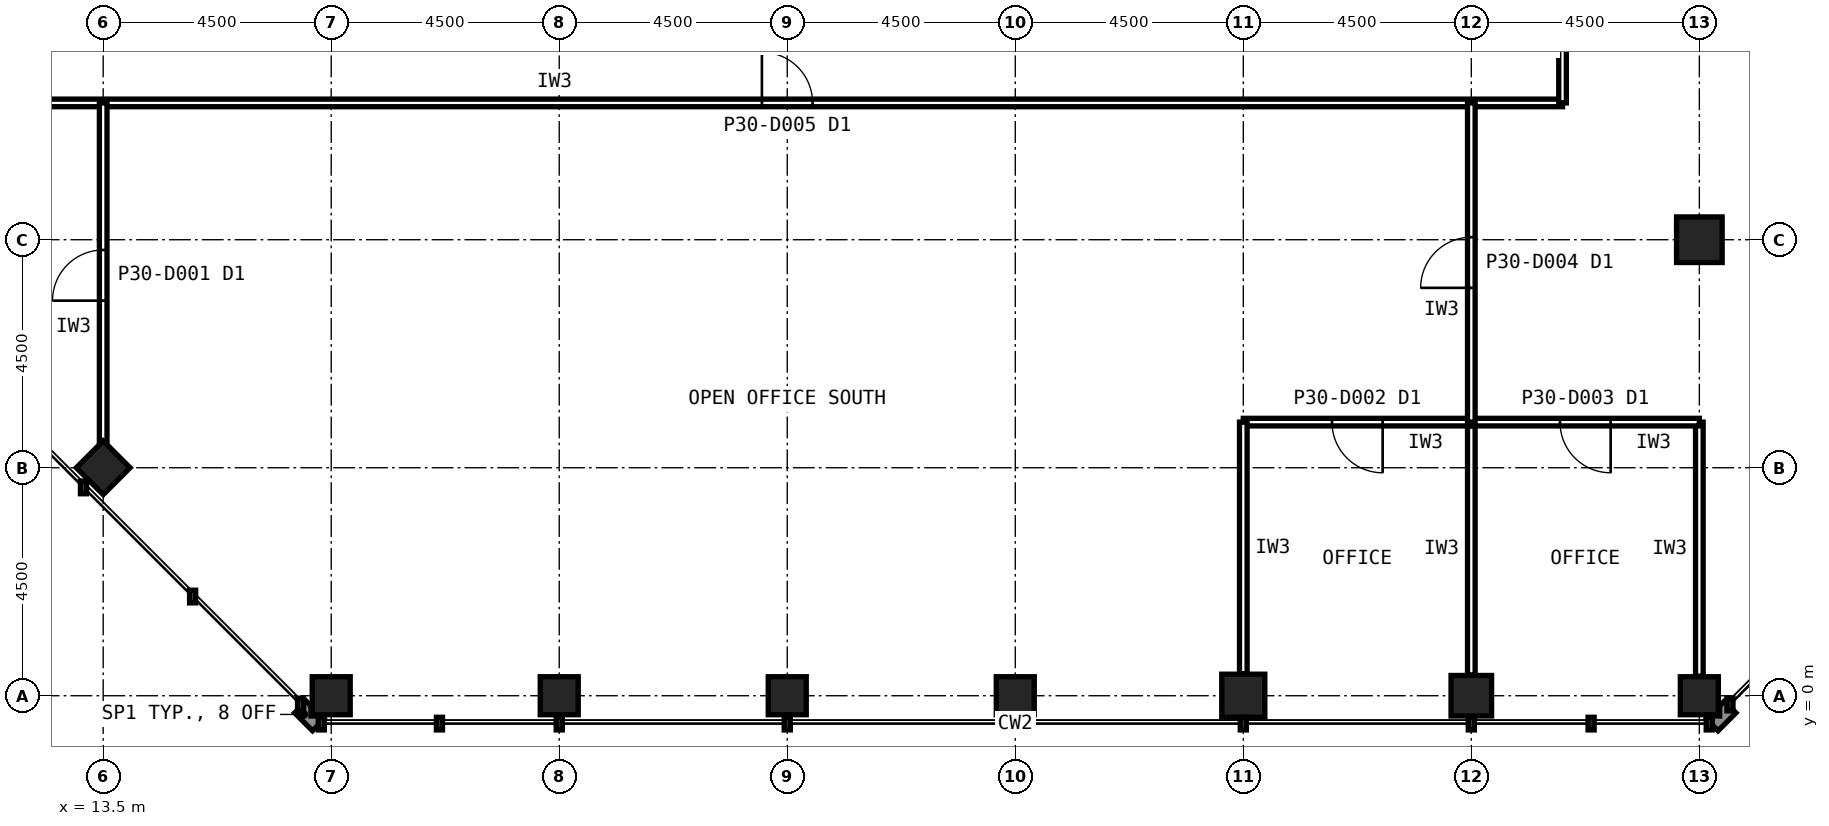
"""IFC4 building model, lengths in metres.
Left out: names, types, materials, properties, quantities, classifications, styles, units other than length and angle.
Written with IfcOpenShell. Run it as: python <this file> out.ifc"""

import sys

from ifc_helpers import new_model, si_unit, direction, frame, frame_2d, origin, origin_2d, place, context, subcontext, project, spatial, rectangle, hollow_rectangle, extrude, element, fill, save


model = new_model("IFC4")
c1 = context("Model", 3, precision=1e-05, world=origin(), true_north=direction((0.0, 1.0)))
c2 = subcontext(c1, "Body", "Model", "MODEL_VIEW")
j1 = project(units=[si_unit("LENGTHUNIT", "METRE"), si_unit("PLANEANGLEUNIT", "RADIAN")], contexts=[c1])
p1 = place(None, origin())
s1 = spatial("IfcSite", under=j1, at=p1, CompositionType="ELEMENT")
p2 = place(p1, origin())
s2 = spatial("IfcBuilding", under=s1, at=p2, CompositionType="ELEMENT")
p3 = place(p2, frame((0.0, 0.0, 127.6)))
s3 = spatial("IfcBuildingStorey", under=s2, at=p3, CompositionType="ELEMENT", Elevation=127.6)
for number, where, z_axis, x_axis in (
    (1, (18.0, 0.0, 0.0), (0.0, 0.0, 1.0), (1.0, 0.0, 0.0)),
    (2, (22.5, 0.0, 0.0), (0.0, 0.0, 1.0), (1.0, 0.0, 0.0)),
    (3, (27.0, 0.0, 0.0), (0.0, 0.0, 1.0), (1.0, 0.0, 0.0)),
    (4, (31.5, 0.0, 0.0), (0.0, 0.0, 1.0), (1.0, 0.0, 0.0)),
):
    element("IfcColumn", number, at=place(p3, frame(where, z_axis=z_axis, x_axis=x_axis)), inside=s3, PredefinedType="COLUMN", context=c2, shape_type="SweptSolid", body=[
        extrude(hollow_rectangle(XDim=0.75, YDim=0.75, WallThickness=0.04, at=origin_2d()), origin(), (0.0, 0.0, 1.0), 4.0),
    ])
p4 = place(p3, frame((36.0, 0.0, 0.0), z_axis=(0.0, 0.0, 1.0), x_axis=(1.0, 0.0, 0.0)))
e5 = element("IfcColumn", 5, at=p4, inside=s3, PredefinedType="COLUMN", context=c2, shape_type="SweptSolid", body=[
    extrude(hollow_rectangle(XDim=0.85, YDim=0.85, WallThickness=0.05, at=origin_2d()), origin(), (0.0, 0.0, 1.0), 4.0),
])
p5 = place(p3, frame((40.5, 0.0, 0.0), z_axis=(0.0, 0.0, 1.0), x_axis=(1.0, 0.0, 0.0)))
e6 = element("IfcColumn", 6, at=p5, inside=s3, PredefinedType="COLUMN", context=c2, shape_type="SweptSolid", body=[
    extrude(hollow_rectangle(XDim=0.8, YDim=0.8, WallThickness=0.045, at=origin_2d()), origin(), (0.0, 0.0, 1.0), 4.0),
])
for number, where, z_axis, x_axis in (
    (7, (45.0, 0.0, 0.0), (0.0, 0.0, 1.0), (1.0, 0.0, 0.0)),
    (8, (13.5, 4.5, 0.0), (0.0, 0.0, 1.0), (0.707, 0.707, 0.0)),
):
    element("IfcColumn", number, at=place(p3, frame(where, z_axis=z_axis, x_axis=x_axis)), inside=s3, PredefinedType="COLUMN", context=c2, shape_type="SweptSolid", body=[
        extrude(hollow_rectangle(XDim=0.75, YDim=0.75, WallThickness=0.04, at=origin_2d()), origin(), (0.0, 0.0, 1.0), 4.0),
    ])
p6 = place(p3, frame((45.0, 9.0, 0.0), z_axis=(0.0, 0.0, 1.0), x_axis=(1.0, 0.0, 0.0)))
e9 = element("IfcColumn", 9, at=p6, inside=s3, PredefinedType="COLUMN", context=c2, shape_type="SweptSolid", body=[
    extrude(hollow_rectangle(XDim=0.9, YDim=0.9, WallThickness=0.063, at=origin_2d()), origin(), (0.0, 0.0, 1.0), 4.0),
])
p7 = place(p3, frame((11.7, 11.7, 0.0), z_axis=(0.0, 0.0, 1.0), x_axis=(1.0, 0.0, 0.0)))
e10 = element("IfcWall", 10, at=p7, inside=s3, PredefinedType="PARTITIONING", context=c2, shape_type="SweptSolid", body=[
    extrude(rectangle(XDim=30.6, YDim=0.15, at=frame_2d((15.3, 0.0))), origin(), (0.0, 0.0, 1.0), 3.84),
])
p8 = place(p7, frame((14.8, 0.0, 0.0)))
e11 = element("IfcOpeningElement", 11, at=p8, cuts=e10, PredefinedType="OPENING", context=c2, shape_type="SweptSolid", body=[
    extrude(rectangle(XDim=1.0, YDim=2.1, at=frame_2d((0.5, 1.05))), frame((0.0, 0.085, 0.0), z_axis=(0.0, -1.0, 0.0), x_axis=(1.0, 0.0, 0.0)), (0.0, 0.0, 1.0), 0.17),
])
p9 = place(p3, frame((42.3, 11.7, 0.0), z_axis=(0.0, 0.0, 1.0), x_axis=(0.0, 1.0, 0.0)))
e12 = element("IfcWall", 12, at=p9, inside=s3, PredefinedType="PARTITIONING", context=c2, shape_type="SweptSolid", body=[
    extrude(rectangle(XDim=28.8, YDim=0.15, at=frame_2d((14.4, 0.0))), origin(), (0.0, 0.0, 1.0), 3.84),
])
p10 = place(p9, frame((13.9, 0.0, 0.0)))
e13 = element("IfcOpeningElement", 13, at=p10, cuts=e12, PredefinedType="OPENING", context=c2, shape_type="SweptSolid", body=[
    extrude(rectangle(XDim=1.0, YDim=2.1, at=frame_2d((0.5, 1.05))), frame((0.0, 0.085, 0.0), z_axis=(0.0, -1.0, 0.0), x_axis=(1.0, 0.0, 0.0)), (0.0, 0.0, 1.0), 0.17),
])
p11 = place(p3, frame((40.5, 0.41, 0.0), z_axis=(0.0, 0.0, 1.0), x_axis=(0.0, 1.0, 0.0)))
e14 = element("IfcWall", 14, at=p11, inside=s3, PredefinedType="PARTITIONING", context=c2, shape_type="SweptSolid", body=[
    extrude(rectangle(XDim=4.99, YDim=0.15, at=frame_2d((2.495, 0.0))), origin(), (0.0, 0.0, 1.0), 2.989),
])
p12 = place(p3, frame((40.5, 5.4, 0.0), z_axis=(0.0, 0.0, 1.0), x_axis=(-1.0, 0.0, 0.0)))
e15 = element("IfcWall", 15, at=p12, inside=s3, PredefinedType="PARTITIONING", context=c2, shape_type="SweptSolid", body=[
    extrude(rectangle(XDim=4.5, YDim=0.15, at=frame_2d((2.25, 0.0))), origin(), (0.0, 0.0, 1.0), 3.84),
])
p13 = place(p12, frame((1.75, 0.0, 0.0)))
e16 = element("IfcOpeningElement", 16, at=p13, cuts=e15, PredefinedType="OPENING", context=c2, shape_type="SweptSolid", body=[
    extrude(rectangle(XDim=1.0, YDim=2.1, at=frame_2d((0.5, 1.05))), frame((0.0, 0.085, 0.0), z_axis=(0.0, -1.0, 0.0), x_axis=(1.0, 0.0, 0.0)), (0.0, 0.0, 1.0), 0.17),
])
p14 = place(p3, frame((36.0, 5.4, 0.0), z_axis=(0.0, 0.0, 1.0), x_axis=(0.0, -1.0, 0.0)))
e17 = element("IfcWall", 17, at=p14, inside=s3, PredefinedType="PARTITIONING", context=c2, shape_type="SweptSolid", body=[
    extrude(rectangle(XDim=4.965, YDim=0.15, at=frame_2d((2.482, 0.0))), origin(), (0.0, 0.0, 1.0), 2.989),
])
p15 = place(p3, frame((45.0, 0.385, 0.0), z_axis=(0.0, 0.0, 1.0), x_axis=(0.0, 1.0, 0.0)))
e18 = element("IfcWall", 18, at=p15, inside=s3, PredefinedType="PARTITIONING", context=c2, shape_type="SweptSolid", body=[
    extrude(rectangle(XDim=5.015, YDim=0.15, at=frame_2d((2.507, 0.0))), origin(), (0.0, 0.0, 1.0), 3.229),
])
p16 = place(p3, frame((45.0, 5.4, 0.0), z_axis=(0.0, 0.0, 1.0), x_axis=(-1.0, 0.0, 0.0)))
e19 = element("IfcWall", 19, at=p16, inside=s3, PredefinedType="PARTITIONING", context=c2, shape_type="SweptSolid", body=[
    extrude(rectangle(XDim=4.5, YDim=0.15, at=frame_2d((2.25, 0.0))), origin(), (0.0, 0.0, 1.0), 3.84),
])
p17 = place(p16, frame((1.75, 0.0, 0.0)))
e20 = element("IfcOpeningElement", 20, at=p17, cuts=e19, PredefinedType="OPENING", context=c2, shape_type="SweptSolid", body=[
    extrude(rectangle(XDim=1.0, YDim=2.1, at=frame_2d((0.5, 1.05))), frame((0.0, 0.085, 0.0), z_axis=(0.0, -1.0, 0.0), x_axis=(1.0, 0.0, 0.0)), (0.0, 0.0, 1.0), 0.17),
])
p18 = place(p3, frame((40.5, 5.4, 0.0), z_axis=(0.0, 0.0, 1.0), x_axis=(0.0, 1.0, 0.0)))
e21 = element("IfcWall", 21, at=p18, inside=s3, PredefinedType="PARTITIONING", context=c2, shape_type="SweptSolid", body=[
    extrude(rectangle(XDim=6.3, YDim=0.15, at=frame_2d((3.15, 0.0))), origin(), (0.0, 0.0, 1.0), 2.989),
])
p19 = place(p18, frame((2.65, 0.0, 0.0)))
e22 = element("IfcOpeningElement", 22, at=p19, cuts=e21, PredefinedType="OPENING", context=c2, shape_type="SweptSolid", body=[
    extrude(rectangle(XDim=1.0, YDim=2.1, at=frame_2d((0.5, 1.05))), frame((0.0, 0.085, 0.0), z_axis=(0.0, -1.0, 0.0), x_axis=(1.0, 0.0, 0.0)), (0.0, 0.0, 1.0), 0.17),
])
p20 = place(p3, frame((13.5, 4.895, 0.0), z_axis=(0.0, 0.0, 1.0), x_axis=(0.0, 1.0, 0.0)))
e23 = element("IfcWall", 23, at=p20, inside=s3, PredefinedType="PARTITIONING", context=c2, shape_type="SweptSolid", body=[
    extrude(rectangle(XDim=6.805, YDim=0.15, at=frame_2d((3.402, 0.0))), origin(), (0.0, 0.0, 1.0), 2.989),
])
p21 = place(p20, frame((2.903, 0.0, 0.0)))
e24 = element("IfcOpeningElement", 24, at=p21, cuts=e23, PredefinedType="OPENING", context=c2, shape_type="SweptSolid", body=[
    extrude(rectangle(XDim=1.0, YDim=2.1, at=frame_2d((0.5, 1.05))), frame((0.0, 0.085, 0.0), z_axis=(0.0, -1.0, 0.0), x_axis=(1.0, 0.0, 0.0)), (0.0, 0.0, 1.0), 0.17),
])
p22 = place(p8, origin())
e25 = element("IfcDoor", 25, at=p22, inside=s3, OperationType="SINGLE_SWING_LEFT", PredefinedType="DOOR", context=c2, shape_type="SweptSolid", body=[
    extrude(rectangle(XDim=1.0, YDim=2.1, at=frame_2d((0.5, 1.05))), frame((0.0, 0.025, 0.0), z_axis=(0.0, -1.0, 0.0), x_axis=(1.0, 0.0, 0.0)), (0.0, 0.0, 1.0), 0.05),
])
fill(e11, e25)
p23 = place(p13, origin())
e26 = element("IfcDoor", 26, at=p23, inside=s3, OperationType="SINGLE_SWING_LEFT", PredefinedType="DOOR", context=c2, shape_type="SweptSolid", body=[
    extrude(rectangle(XDim=1.0, YDim=2.1, at=frame_2d((0.5, 1.05))), frame((0.0, 0.025, 0.0), z_axis=(0.0, -1.0, 0.0), x_axis=(1.0, 0.0, 0.0)), (0.0, 0.0, 1.0), 0.05),
])
fill(e16, e26)
p24 = place(p17, origin())
e27 = element("IfcDoor", 27, at=p24, inside=s3, OperationType="SINGLE_SWING_LEFT", PredefinedType="DOOR", context=c2, shape_type="SweptSolid", body=[
    extrude(rectangle(XDim=1.0, YDim=2.1, at=frame_2d((0.5, 1.05))), frame((0.0, 0.025, 0.0), z_axis=(0.0, -1.0, 0.0), x_axis=(1.0, 0.0, 0.0)), (0.0, 0.0, 1.0), 0.05),
])
fill(e20, e27)
p25 = place(p19, origin())
e28 = element("IfcDoor", 28, at=p25, inside=s3, OperationType="SINGLE_SWING_LEFT", PredefinedType="DOOR", context=c2, shape_type="SweptSolid", body=[
    extrude(rectangle(XDim=1.0, YDim=2.1, at=frame_2d((0.5, 1.05))), frame((0.0, 0.025, 0.0), z_axis=(0.0, -1.0, 0.0), x_axis=(1.0, 0.0, 0.0)), (0.0, 0.0, 1.0), 0.05),
])
fill(e22, e28)
p26 = place(p21, origin())
e29 = element("IfcDoor", 29, at=p26, inside=s3, OperationType="SINGLE_SWING_LEFT", PredefinedType="DOOR", context=c2, shape_type="SweptSolid", body=[
    extrude(rectangle(XDim=1.0, YDim=2.1, at=frame_2d((0.5, 1.05))), frame((0.0, 0.025, 0.0), z_axis=(0.0, -1.0, 0.0), x_axis=(1.0, 0.0, 0.0)), (0.0, 0.0, 1.0), 0.05),
])
fill(e24, e29)
save(model, sys.argv[1])
